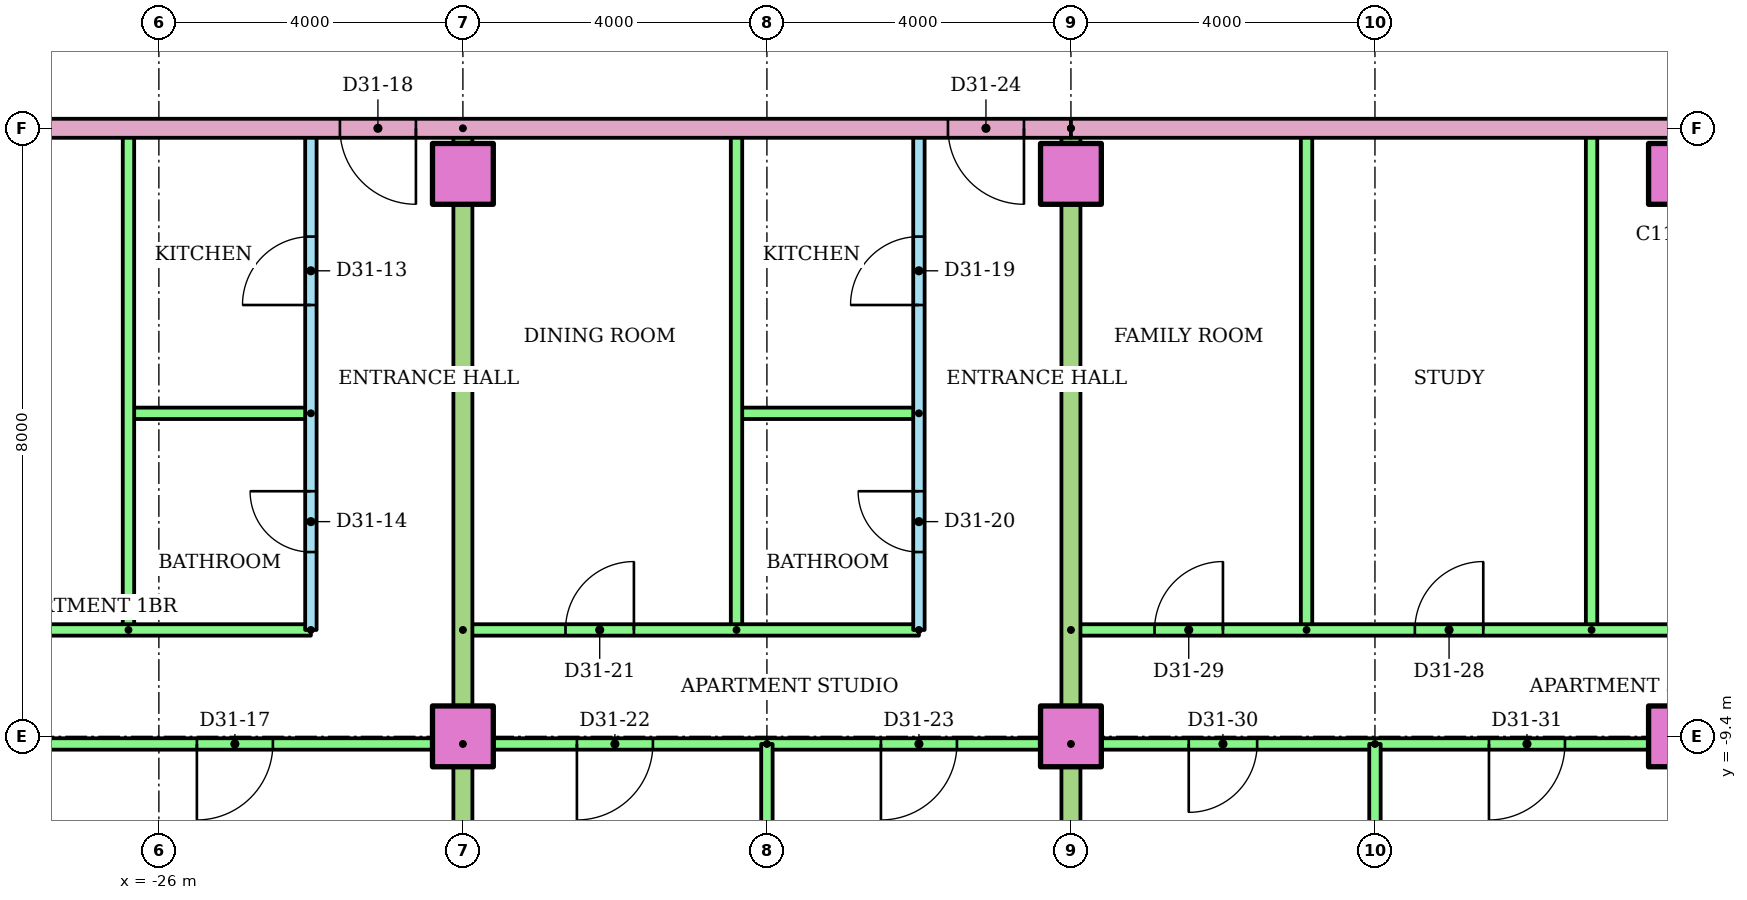
"""IFC4 building model, lengths in metres.
Left out: names, types, materials, properties, quantities, classifications, styles, units other than length and angle.
Written with IfcOpenShell. Run it as: python <this file> out.ifc"""

import sys

from ifc_helpers import new_model, si_unit, direction, frame, frame_2d, origin, origin_2d, place, context, subcontext, project, spatial, rectangle, extrude, element, fill, save


model = new_model("IFC4")
c1 = context("Model", 3, precision=1e-05, world=origin(), true_north=direction((0.0, 1.0)))
c2 = subcontext(c1, "Body", "Model", "MODEL_VIEW")
j1 = project(units=[si_unit("LENGTHUNIT", "METRE"), si_unit("PLANEANGLEUNIT", "RADIAN")], contexts=[c1])
p1 = place(None, origin())
s1 = spatial("IfcSite", under=j1, at=p1, CompositionType="ELEMENT")
p2 = place(p1, origin())
s2 = spatial("IfcBuilding", under=s1, at=p2, CompositionType="ELEMENT")
p3 = place(p2, frame((0.0, 0.0, 123.0)))
s3 = spatial("IfcBuildingStorey", under=s2, at=p3, CompositionType="ELEMENT", Elevation=123.0)
for number, where in (
    (1, (-22.0, -9.4, 0.0)),
    (2, (-14.0, -9.4, 0.0)),
    (3, (-6.0, -9.4, 0.0)),
    (4, (-22.0, -2.0, 0.0)),
    (5, (-14.0, -2.0, 0.0)),
    (6, (-6.0, -2.0, 0.0)),
):
    element("IfcColumn", number, at=place(p3, frame(where)), inside=s3, PredefinedType="COLUMN", context=c2, shape_type="SweptSolid", body=[
        extrude(rectangle(XDim=0.8, YDim=0.8, at=origin_2d()), origin(), (0.0, 0.0, 1.0), 3.2),
    ])
p4 = place(p3, frame((-24.0, -8.0, 0.0), z_axis=(0.0, 0.0, 1.0), x_axis=(0.0, 1.0, 0.0)))
e7 = element("IfcWall", 7, at=p4, inside=s3, PredefinedType="PARTITIONING", context=c2, shape_type="SweptSolid", body=[
    extrude(rectangle(XDim=6.6, YDim=0.15, at=frame_2d((3.3, 0.0))), origin(), (0.0, 0.0, 1.0), 2.4),
])
p5 = place(p4, frame((4.275, 0.0, 0.0)))
e8 = element("IfcOpeningElement", 8, at=p5, cuts=e7, PredefinedType="OPENING", context=c2, shape_type="SweptSolid", body=[
    extrude(rectangle(XDim=0.9, YDim=2.1, at=frame_2d((0.45, 1.05))), frame((0.0, 0.085, 0.0), z_axis=(0.0, -1.0, 0.0), x_axis=(1.0, 0.0, 0.0)), (0.0, 0.0, 1.0), 0.17),
])
p6 = place(p4, frame((1.025, 0.0, 0.0)))
e9 = element("IfcOpeningElement", 9, at=p6, cuts=e7, PredefinedType="OPENING", context=c2, shape_type="SweptSolid", body=[
    extrude(rectangle(XDim=0.8, YDim=2.1, at=frame_2d((0.4, 1.05))), frame((0.0, 0.085, 0.0), z_axis=(0.0, -1.0, 0.0), x_axis=(1.0, 0.0, 0.0)), (0.0, 0.0, 1.0), 0.17),
])
p7 = place(p3, frame((-24.0, -5.15, 0.0), z_axis=(0.0, 0.0, 1.0), x_axis=(-1.0, 0.0, 0.0)))
e10 = element("IfcWall", 10, at=p7, inside=s3, PredefinedType="PARTITIONING", context=c2, shape_type="SweptSolid", body=[
    extrude(rectangle(XDim=2.4, YDim=0.15, at=frame_2d((1.2, 0.0))), origin(), (0.0, 0.0, 1.0), 2.4),
])
p8 = place(p3, frame((-26.4, -8.0, 0.0), z_axis=(0.0, 0.0, 1.0), x_axis=(0.0, 1.0, 0.0)))
e11 = element("IfcWall", 11, at=p8, inside=s3, PredefinedType="PARTITIONING", context=c2, shape_type="SweptSolid", body=[
    extrude(rectangle(XDim=6.6, YDim=0.15, at=frame_2d((3.3, 0.0))), origin(), (0.0, 0.0, 1.0), 2.4),
])
p9 = place(p3, frame((-32.71, -8.0, 0.0)))
e12 = element("IfcWall", 12, at=p9, inside=s3, PredefinedType="PARTITIONING", context=c2, shape_type="SweptSolid", body=[
    extrude(rectangle(XDim=8.71, YDim=0.15, at=frame_2d((4.355, 0.0))), origin(), (0.0, 0.0, 1.0), 2.4),
])
p10 = place(p9, frame((3.328, 0.0, 0.0)))
e13 = element("IfcOpeningElement", 13, at=p10, cuts=e12, PredefinedType="OPENING", context=c2, shape_type="SweptSolid", body=[
    extrude(rectangle(XDim=0.9, YDim=2.1, at=frame_2d((0.45, 1.05))), frame((0.0, 0.085, 0.0), z_axis=(0.0, -1.0, 0.0), x_axis=(1.0, 0.0, 0.0)), (0.0, 0.0, 1.0), 0.17),
])
p11 = place(p3, frame((-22.0, -9.5, 0.0), z_axis=(0.0, 0.0, 1.0), x_axis=(-1.0, 0.0, 0.0)))
e14 = element("IfcWall", 14, at=p11, inside=s3, PredefinedType="PARTITIONING", context=c2, shape_type="SweptSolid", body=[
    extrude(rectangle(XDim=10.72, YDim=0.15, at=frame_2d((5.36, 0.0))), origin(), (0.0, 0.0, 1.0), 2.4),
])
p12 = place(p11, frame((8.618, 0.0, 0.0)))
e15 = element("IfcOpeningElement", 15, at=p12, cuts=e14, PredefinedType="OPENING", context=c2, shape_type="SweptSolid", body=[
    extrude(rectangle(XDim=0.9, YDim=2.1, at=frame_2d((0.45, 1.05))), frame((0.0, 0.085, 0.0), z_axis=(0.0, -1.0, 0.0), x_axis=(1.0, 0.0, 0.0)), (0.0, 0.0, 1.0), 0.17),
])
p13 = place(p11, frame((2.5, 0.0, 0.0)))
e16 = element("IfcOpeningElement", 16, at=p13, cuts=e14, PredefinedType="OPENING", context=c2, shape_type="SweptSolid", body=[
    extrude(rectangle(XDim=1.0, YDim=2.1, at=frame_2d((0.5, 1.05))), frame((0.0, 0.085, 0.0), z_axis=(0.0, -1.0, 0.0), x_axis=(1.0, 0.0, 0.0)), (0.0, 0.0, 1.0), 0.17),
])
p14 = place(p3, frame((-16.0, -8.0, 0.0), z_axis=(0.0, 0.0, 1.0), x_axis=(0.0, 1.0, 0.0)))
e17 = element("IfcWall", 17, at=p14, inside=s3, PredefinedType="PARTITIONING", context=c2, shape_type="SweptSolid", body=[
    extrude(rectangle(XDim=6.6, YDim=0.15, at=frame_2d((3.3, 0.0))), origin(), (0.0, 0.0, 1.0), 2.4),
])
p15 = place(p14, frame((4.275, 0.0, 0.0)))
e18 = element("IfcOpeningElement", 18, at=p15, cuts=e17, PredefinedType="OPENING", context=c2, shape_type="SweptSolid", body=[
    extrude(rectangle(XDim=0.9, YDim=2.1, at=frame_2d((0.45, 1.05))), frame((0.0, 0.085, 0.0), z_axis=(0.0, -1.0, 0.0), x_axis=(1.0, 0.0, 0.0)), (0.0, 0.0, 1.0), 0.17),
])
p16 = place(p14, frame((1.025, 0.0, 0.0)))
e19 = element("IfcOpeningElement", 19, at=p16, cuts=e17, PredefinedType="OPENING", context=c2, shape_type="SweptSolid", body=[
    extrude(rectangle(XDim=0.8, YDim=2.1, at=frame_2d((0.4, 1.05))), frame((0.0, 0.085, 0.0), z_axis=(0.0, -1.0, 0.0), x_axis=(1.0, 0.0, 0.0)), (0.0, 0.0, 1.0), 0.17),
])
p17 = place(p3, frame((-16.0, -5.15, 0.0), z_axis=(0.0, 0.0, 1.0), x_axis=(-1.0, 0.0, 0.0)))
e20 = element("IfcWall", 20, at=p17, inside=s3, PredefinedType="PARTITIONING", context=c2, shape_type="SweptSolid", body=[
    extrude(rectangle(XDim=2.4, YDim=0.15, at=frame_2d((1.2, 0.0))), origin(), (0.0, 0.0, 1.0), 2.4),
])
p18 = place(p3, frame((-18.4, -8.0, 0.0), z_axis=(0.0, 0.0, 1.0), x_axis=(0.0, 1.0, 0.0)))
e21 = element("IfcWall", 21, at=p18, inside=s3, PredefinedType="PARTITIONING", context=c2, shape_type="SweptSolid", body=[
    extrude(rectangle(XDim=6.6, YDim=0.15, at=frame_2d((3.3, 0.0))), origin(), (0.0, 0.0, 1.0), 2.4),
])
p19 = place(p3, frame((-22.0, -8.0, 0.0)))
e22 = element("IfcWall", 22, at=p19, inside=s3, PredefinedType="PARTITIONING", context=c2, shape_type="SweptSolid", body=[
    extrude(rectangle(XDim=6.0, YDim=0.15, at=frame_2d((3.0, 0.0))), origin(), (0.0, 0.0, 1.0), 2.4),
])
p20 = place(p19, frame((1.35, 0.0, 0.0)))
e23 = element("IfcOpeningElement", 23, at=p20, cuts=e22, PredefinedType="OPENING", context=c2, shape_type="SweptSolid", body=[
    extrude(rectangle(XDim=0.9, YDim=2.1, at=frame_2d((0.45, 1.05))), frame((0.0, 0.085, 0.0), z_axis=(0.0, -1.0, 0.0), x_axis=(1.0, 0.0, 0.0)), (0.0, 0.0, 1.0), 0.17),
])
p21 = place(p3, frame((-14.0, -9.5, 0.0), z_axis=(0.0, 0.0, 1.0), x_axis=(-1.0, 0.0, 0.0)))
e24 = element("IfcWall", 24, at=p21, inside=s3, PredefinedType="PARTITIONING", context=c2, shape_type="SweptSolid", body=[
    extrude(rectangle(XDim=8.0, YDim=0.15, at=frame_2d((4.0, 0.0))), origin(), (0.0, 0.0, 1.0), 2.4),
])
p22 = place(p21, frame((5.5, 0.0, 0.0)))
e25 = element("IfcOpeningElement", 25, at=p22, cuts=e24, PredefinedType="OPENING", context=c2, shape_type="SweptSolid", body=[
    extrude(rectangle(XDim=1.0, YDim=2.1, at=frame_2d((0.5, 1.05))), frame((0.0, 0.085, 0.0), z_axis=(0.0, -1.0, 0.0), x_axis=(1.0, 0.0, 0.0)), (0.0, 0.0, 1.0), 0.17),
])
p23 = place(p21, frame((1.5, 0.0, 0.0)))
e26 = element("IfcOpeningElement", 26, at=p23, cuts=e24, PredefinedType="OPENING", context=c2, shape_type="SweptSolid", body=[
    extrude(rectangle(XDim=1.0, YDim=2.1, at=frame_2d((0.5, 1.05))), frame((0.0, 0.085, 0.0), z_axis=(0.0, -1.0, 0.0), x_axis=(1.0, 0.0, 0.0)), (0.0, 0.0, 1.0), 0.17),
])
p24 = place(p3, frame((-18.0, -9.5, 0.0), z_axis=(0.0, 0.0, 1.0), x_axis=(0.0, -1.0, 0.0)))
e27 = element("IfcWall", 27, at=p24, inside=s3, PredefinedType="PARTITIONING", context=c2, shape_type="SweptSolid", body=[
    extrude(rectangle(XDim=6.821, YDim=0.15, at=frame_2d((3.411, 0.0))), origin(), (0.0, 0.0, 1.0), 2.4),
])
p25 = place(p3, frame((-22.0, -1.4, 0.0), z_axis=(0.0, 0.0, 1.0), x_axis=(0.0, -1.0, 0.0)))
e28 = element("IfcWall", 28, at=p25, inside=s3, PredefinedType="PARTITIONING", context=c2, shape_type="SweptSolid", body=[
    extrude(rectangle(XDim=14.91, YDim=0.25, at=frame_2d((7.455, 0.0))), origin(), (0.0, 0.0, 1.0), 2.4),
])
for number, where, z_axis, x_axis in (
    (29, (-7.15, -8.0, 0.0), (0.0, 0.0, 1.0), (0.0, 1.0, 0.0)),
    (30, (-10.9, -8.0, 0.0), (0.0, 0.0, 1.0), (0.0, 1.0, 0.0)),
):
    element("IfcWall", number, at=place(p3, frame(where, z_axis=z_axis, x_axis=x_axis)), inside=s3, PredefinedType="PARTITIONING", context=c2, shape_type="SweptSolid", body=[
        extrude(rectangle(XDim=6.6, YDim=0.15, at=frame_2d((3.3, 0.0))), origin(), (0.0, 0.0, 1.0), 2.4),
    ])
p26 = place(p3, frame((-14.0, -8.0, 0.0)))
e31 = element("IfcWall", 31, at=p26, inside=s3, PredefinedType="PARTITIONING", context=c2, shape_type="SweptSolid", body=[
    extrude(rectangle(XDim=14.0, YDim=0.15, at=frame_2d((7.0, 0.0))), origin(), (0.0, 0.0, 1.0), 2.4),
])
p27 = place(p26, frame((8.775, 0.0, 0.0)))
e32 = element("IfcOpeningElement", 32, at=p27, cuts=e31, PredefinedType="OPENING", context=c2, shape_type="SweptSolid", body=[
    extrude(rectangle(XDim=0.9, YDim=2.1, at=frame_2d((0.45, 1.05))), frame((0.0, 0.085, 0.0), z_axis=(0.0, -1.0, 0.0), x_axis=(1.0, 0.0, 0.0)), (0.0, 0.0, 1.0), 0.17),
])
p28 = place(p26, frame((4.525, 0.0, 0.0)))
e33 = element("IfcOpeningElement", 33, at=p28, cuts=e31, PredefinedType="OPENING", context=c2, shape_type="SweptSolid", body=[
    extrude(rectangle(XDim=0.9, YDim=2.1, at=frame_2d((0.45, 1.05))), frame((0.0, 0.085, 0.0), z_axis=(0.0, -1.0, 0.0), x_axis=(1.0, 0.0, 0.0)), (0.0, 0.0, 1.0), 0.17),
])
p29 = place(p26, frame((1.1, 0.0, 0.0)))
e34 = element("IfcOpeningElement", 34, at=p29, cuts=e31, PredefinedType="OPENING", context=c2, shape_type="SweptSolid", body=[
    extrude(rectangle(XDim=0.9, YDim=2.1, at=frame_2d((0.45, 1.05))), frame((0.0, 0.085, 0.0), z_axis=(0.0, -1.0, 0.0), x_axis=(1.0, 0.0, 0.0)), (0.0, 0.0, 1.0), 0.17),
])
p30 = place(p3, frame((2.0, -9.5, 0.0), z_axis=(0.0, 0.0, 1.0), x_axis=(-1.0, 0.0, 0.0)))
e35 = element("IfcWall", 35, at=p30, inside=s3, PredefinedType="PARTITIONING", context=c2, shape_type="SweptSolid", body=[
    extrude(rectangle(XDim=16.0, YDim=0.15, at=frame_2d((8.0, 0.0))), origin(), (0.0, 0.0, 1.0), 2.4),
])
p31 = place(p30, frame((13.55, 0.0, 0.0)))
e36 = element("IfcOpeningElement", 36, at=p31, cuts=e35, PredefinedType="OPENING", context=c2, shape_type="SweptSolid", body=[
    extrude(rectangle(XDim=0.9, YDim=2.1, at=frame_2d((0.45, 1.05))), frame((0.0, 0.085, 0.0), z_axis=(0.0, -1.0, 0.0), x_axis=(1.0, 0.0, 0.0)), (0.0, 0.0, 1.0), 0.17),
])
p32 = place(p30, frame((9.5, 0.0, 0.0)))
e37 = element("IfcOpeningElement", 37, at=p32, cuts=e35, PredefinedType="OPENING", context=c2, shape_type="SweptSolid", body=[
    extrude(rectangle(XDim=1.0, YDim=2.1, at=frame_2d((0.5, 1.05))), frame((0.0, 0.085, 0.0), z_axis=(0.0, -1.0, 0.0), x_axis=(1.0, 0.0, 0.0)), (0.0, 0.0, 1.0), 0.17),
])
p33 = place(p30, frame((5.55, 0.0, 0.0)))
e38 = element("IfcOpeningElement", 38, at=p33, cuts=e35, PredefinedType="OPENING", context=c2, shape_type="SweptSolid", body=[
    extrude(rectangle(XDim=0.9, YDim=2.1, at=frame_2d((0.45, 1.05))), frame((0.0, 0.085, 0.0), z_axis=(0.0, -1.0, 0.0), x_axis=(1.0, 0.0, 0.0)), (0.0, 0.0, 1.0), 0.17),
])
p34 = place(p30, frame((1.55, 0.0, 0.0)))
e39 = element("IfcOpeningElement", 39, at=p34, cuts=e35, PredefinedType="OPENING", context=c2, shape_type="SweptSolid", body=[
    extrude(rectangle(XDim=0.9, YDim=2.1, at=frame_2d((0.45, 1.05))), frame((0.0, 0.085, 0.0), z_axis=(0.0, -1.0, 0.0), x_axis=(1.0, 0.0, 0.0)), (0.0, 0.0, 1.0), 0.17),
])
p35 = place(p3, frame((-10.0, -9.5, 0.0), z_axis=(0.0, 0.0, 1.0), x_axis=(0.0, -1.0, 0.0)))
e40 = element("IfcWall", 40, at=p35, inside=s3, PredefinedType="PARTITIONING", context=c2, shape_type="SweptSolid", body=[
    extrude(rectangle(XDim=6.821, YDim=0.15, at=frame_2d((3.411, 0.0))), origin(), (0.0, 0.0, 1.0), 2.4),
])
p36 = place(p3, frame((-14.0, -1.4, 0.0), z_axis=(0.0, 0.0, 1.0), x_axis=(0.0, -1.0, 0.0)))
e41 = element("IfcWall", 41, at=p36, inside=s3, PredefinedType="PARTITIONING", context=c2, shape_type="SweptSolid", body=[
    extrude(rectangle(XDim=14.91, YDim=0.25, at=frame_2d((7.455, 0.0))), origin(), (0.0, 0.0, 1.0), 2.4),
])
p37 = place(p3, frame((-14.0, -1.4, 0.0), z_axis=(0.0, 0.0, 1.0), x_axis=(-1.0, 0.0, 0.0)))
e42 = element("IfcWall", 42, at=p37, inside=s3, PredefinedType="PARTITIONING", context=c2, shape_type="SweptSolid", body=[
    extrude(rectangle(XDim=15.0, YDim=0.25, at=frame_2d((7.5, 0.0))), origin(), (0.0, 0.0, 1.0), 2.4),
])
p38 = place(p37, frame((8.618, 0.0, 0.0)))
e43 = element("IfcOpeningElement", 43, at=p38, cuts=e42, PredefinedType="OPENING", context=c2, shape_type="SweptSolid", body=[
    extrude(rectangle(XDim=1.0, YDim=2.1, at=frame_2d((0.5, 1.05))), frame((0.0, 0.135, 0.0), z_axis=(0.0, -1.0, 0.0), x_axis=(1.0, 0.0, 0.0)), (0.0, 0.0, 1.0), 0.27),
])
p39 = place(p37, frame((0.618, 0.0, 0.0)))
e44 = element("IfcOpeningElement", 44, at=p39, cuts=e42, PredefinedType="OPENING", context=c2, shape_type="SweptSolid", body=[
    extrude(rectangle(XDim=1.0, YDim=2.1, at=frame_2d((0.5, 1.05))), frame((0.0, 0.135, 0.0), z_axis=(0.0, -1.0, 0.0), x_axis=(1.0, 0.0, 0.0)), (0.0, 0.0, 1.0), 0.27),
])
p40 = place(p3, frame((14.0, -1.4, 0.0), z_axis=(0.0, 0.0, 1.0), x_axis=(-1.0, 0.0, 0.0)))
e45 = element("IfcWall", 45, at=p40, inside=s3, PredefinedType="PARTITIONING", context=c2, shape_type="SweptSolid", body=[
    extrude(rectangle(XDim=28.0, YDim=0.25, at=frame_2d((14.0, 0.0))), origin(), (0.0, 0.0, 1.0), 2.4),
])
p41 = place(p40, frame((12.618, 0.0, 0.0)))
e46 = element("IfcOpeningElement", 46, at=p41, cuts=e45, PredefinedType="OPENING", context=c2, shape_type="SweptSolid", body=[
    extrude(rectangle(XDim=1.0, YDim=2.1, at=frame_2d((0.5, 1.05))), frame((0.0, 0.135, 0.0), z_axis=(0.0, -1.0, 0.0), x_axis=(1.0, 0.0, 0.0)), (0.0, 0.0, 1.0), 0.27),
])
p42 = place(p40, frame((10.382, 0.0, 0.0)))
e47 = element("IfcOpeningElement", 47, at=p42, cuts=e45, PredefinedType="OPENING", context=c2, shape_type="SweptSolid", body=[
    extrude(rectangle(XDim=1.0, YDim=2.1, at=frame_2d((0.5, 1.05))), frame((0.0, 0.135, 0.0), z_axis=(0.0, -1.0, 0.0), x_axis=(1.0, 0.0, 0.0)), (0.0, 0.0, 1.0), 0.27),
])
p43 = place(p5, origin())
e48 = element("IfcDoor", 48, at=p43, inside=s3, OperationType="SINGLE_SWING_LEFT", PredefinedType="DOOR", context=c2, shape_type="SweptSolid", body=[
    extrude(rectangle(XDim=0.9, YDim=2.1, at=frame_2d((0.45, 1.05))), frame((0.0, 0.025, 0.0), z_axis=(0.0, -1.0, 0.0), x_axis=(1.0, 0.0, 0.0)), (0.0, 0.0, 1.0), 0.05),
])
fill(e8, e48)
p44 = place(p6, origin())
e49 = element("IfcDoor", 49, at=p44, inside=s3, OperationType="SINGLE_SWING_RIGHT", PredefinedType="DOOR", context=c2, shape_type="SweptSolid", body=[
    extrude(rectangle(XDim=0.8, YDim=2.1, at=frame_2d((0.4, 1.05))), frame((0.0, 0.025, 0.0), z_axis=(0.0, -1.0, 0.0), x_axis=(1.0, 0.0, 0.0)), (0.0, 0.0, 1.0), 0.05),
])
fill(e9, e49)
p45 = place(p13, origin())
e50 = element("IfcDoor", 50, at=p45, inside=s3, OperationType="SINGLE_SWING_RIGHT", PredefinedType="DOOR", context=c2, shape_type="SweptSolid", body=[
    extrude(rectangle(XDim=1.0, YDim=2.1, at=frame_2d((0.5, 1.05))), frame((0.0, 0.025, 0.0), z_axis=(0.0, -1.0, 0.0), x_axis=(1.0, 0.0, 0.0)), (0.0, 0.0, 1.0), 0.05),
])
fill(e16, e50)
p46 = place(p38, origin())
e51 = element("IfcDoor", 51, at=p46, inside=s3, OperationType="SINGLE_SWING_LEFT", PredefinedType="DOOR", context=c2, shape_type="SweptSolid", body=[
    extrude(rectangle(XDim=1.0, YDim=2.1, at=frame_2d((0.5, 1.05))), frame((0.0, 0.025, 0.0), z_axis=(0.0, -1.0, 0.0), x_axis=(1.0, 0.0, 0.0)), (0.0, 0.0, 1.0), 0.05),
])
fill(e43, e51)
p47 = place(p15, origin())
e52 = element("IfcDoor", 52, at=p47, inside=s3, OperationType="SINGLE_SWING_LEFT", PredefinedType="DOOR", context=c2, shape_type="SweptSolid", body=[
    extrude(rectangle(XDim=0.9, YDim=2.1, at=frame_2d((0.45, 1.05))), frame((0.0, 0.025, 0.0), z_axis=(0.0, -1.0, 0.0), x_axis=(1.0, 0.0, 0.0)), (0.0, 0.0, 1.0), 0.05),
])
fill(e18, e52)
p48 = place(p16, origin())
e53 = element("IfcDoor", 53, at=p48, inside=s3, OperationType="SINGLE_SWING_RIGHT", PredefinedType="DOOR", context=c2, shape_type="SweptSolid", body=[
    extrude(rectangle(XDim=0.8, YDim=2.1, at=frame_2d((0.4, 1.05))), frame((0.0, 0.025, 0.0), z_axis=(0.0, -1.0, 0.0), x_axis=(1.0, 0.0, 0.0)), (0.0, 0.0, 1.0), 0.05),
])
fill(e19, e53)
p49 = place(p20, origin())
e54 = element("IfcDoor", 54, at=p49, inside=s3, OperationType="SINGLE_SWING_RIGHT", PredefinedType="DOOR", context=c2, shape_type="SweptSolid", body=[
    extrude(rectangle(XDim=0.9, YDim=2.1, at=frame_2d((0.45, 1.05))), frame((0.0, 0.025, 0.0), z_axis=(0.0, -1.0, 0.0), x_axis=(1.0, 0.0, 0.0)), (0.0, 0.0, 1.0), 0.05),
])
fill(e23, e54)
p50 = place(p22, origin())
e55 = element("IfcDoor", 55, at=p50, inside=s3, OperationType="SINGLE_SWING_RIGHT", PredefinedType="DOOR", context=c2, shape_type="SweptSolid", body=[
    extrude(rectangle(XDim=1.0, YDim=2.1, at=frame_2d((0.5, 1.05))), frame((0.0, 0.025, 0.0), z_axis=(0.0, -1.0, 0.0), x_axis=(1.0, 0.0, 0.0)), (0.0, 0.0, 1.0), 0.05),
])
fill(e25, e55)
p51 = place(p23, origin())
e56 = element("IfcDoor", 56, at=p51, inside=s3, OperationType="SINGLE_SWING_RIGHT", PredefinedType="DOOR", context=c2, shape_type="SweptSolid", body=[
    extrude(rectangle(XDim=1.0, YDim=2.1, at=frame_2d((0.5, 1.05))), frame((0.0, 0.025, 0.0), z_axis=(0.0, -1.0, 0.0), x_axis=(1.0, 0.0, 0.0)), (0.0, 0.0, 1.0), 0.05),
])
fill(e26, e56)
p52 = place(p39, origin())
e57 = element("IfcDoor", 57, at=p52, inside=s3, OperationType="SINGLE_SWING_LEFT", PredefinedType="DOOR", context=c2, shape_type="SweptSolid", body=[
    extrude(rectangle(XDim=1.0, YDim=2.1, at=frame_2d((0.5, 1.05))), frame((0.0, 0.025, 0.0), z_axis=(0.0, -1.0, 0.0), x_axis=(1.0, 0.0, 0.0)), (0.0, 0.0, 1.0), 0.05),
])
fill(e44, e57)
p53 = place(p28, origin())
e58 = element("IfcDoor", 58, at=p53, inside=s3, OperationType="SINGLE_SWING_RIGHT", PredefinedType="DOOR", context=c2, shape_type="SweptSolid", body=[
    extrude(rectangle(XDim=0.9, YDim=2.1, at=frame_2d((0.45, 1.05))), frame((0.0, 0.025, 0.0), z_axis=(0.0, -1.0, 0.0), x_axis=(1.0, 0.0, 0.0)), (0.0, 0.0, 1.0), 0.05),
])
fill(e33, e58)
p54 = place(p29, origin())
e59 = element("IfcDoor", 59, at=p54, inside=s3, OperationType="SINGLE_SWING_RIGHT", PredefinedType="DOOR", context=c2, shape_type="SweptSolid", body=[
    extrude(rectangle(XDim=0.9, YDim=2.1, at=frame_2d((0.45, 1.05))), frame((0.0, 0.025, 0.0), z_axis=(0.0, -1.0, 0.0), x_axis=(1.0, 0.0, 0.0)), (0.0, 0.0, 1.0), 0.05),
])
fill(e34, e59)
p55 = place(p31, origin())
e60 = element("IfcDoor", 60, at=p55, inside=s3, OperationType="SINGLE_SWING_RIGHT", PredefinedType="DOOR", context=c2, shape_type="SweptSolid", body=[
    extrude(rectangle(XDim=0.9, YDim=2.1, at=frame_2d((0.45, 1.05))), frame((0.0, 0.025, 0.0), z_axis=(0.0, -1.0, 0.0), x_axis=(1.0, 0.0, 0.0)), (0.0, 0.0, 1.0), 0.05),
])
fill(e36, e60)
p56 = place(p32, origin())
e61 = element("IfcDoor", 61, at=p56, inside=s3, OperationType="SINGLE_SWING_RIGHT", PredefinedType="DOOR", context=c2, shape_type="SweptSolid", body=[
    extrude(rectangle(XDim=1.0, YDim=2.1, at=frame_2d((0.5, 1.05))), frame((0.0, 0.025, 0.0), z_axis=(0.0, -1.0, 0.0), x_axis=(1.0, 0.0, 0.0)), (0.0, 0.0, 1.0), 0.05),
])
fill(e37, e61)
save(model, sys.argv[1])
